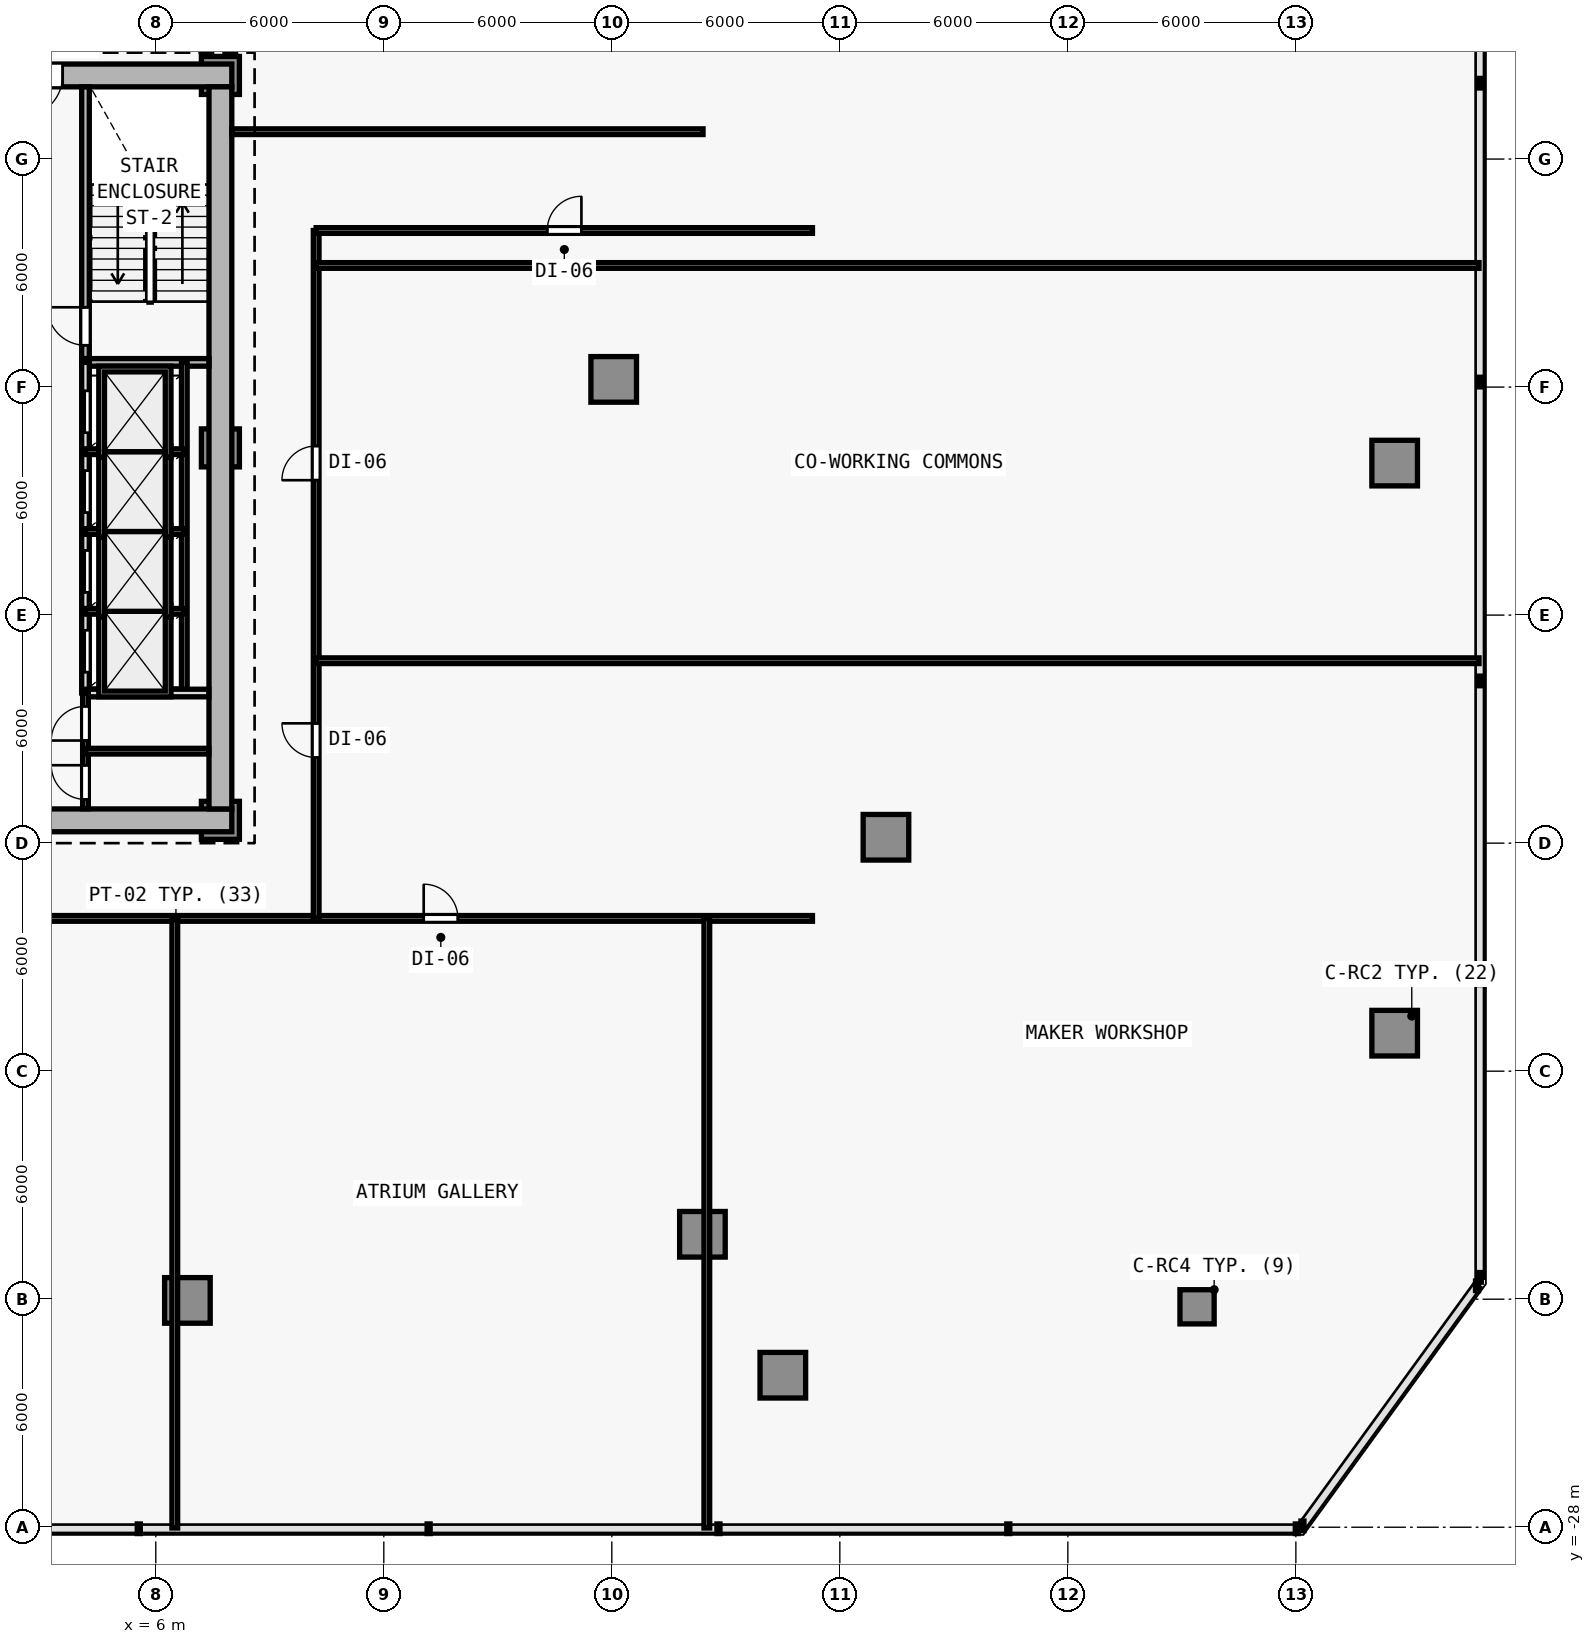
"""IFC4 building model, lengths in metres.
Left out: names, types, materials, properties, quantities, classifications, styles, units other than length and angle.
Written with IfcOpenShell. Run it as: python <this file> out.ifc"""

import sys

from ifc_helpers import new_model, si_unit, direction, frame, frame_2d, origin, origin_2d, place, context, subcontext, project, spatial, rectangle, extrude, element, fill, save


model = new_model("IFC4")
c1 = context("Model", 3, precision=1e-05, world=origin(), true_north=direction((0.0, 1.0)))
c2 = subcontext(c1, "Body", "Model", "MODEL_VIEW")
j1 = project(units=[si_unit("LENGTHUNIT", "METRE"), si_unit("PLANEANGLEUNIT", "RADIAN")], contexts=[c1])
p1 = place(None, origin())
s1 = spatial("IfcSite", under=j1, at=p1, CompositionType="ELEMENT")
p2 = place(p1, origin())
s2 = spatial("IfcBuilding", under=s1, at=p2, CompositionType="ELEMENT")
p3 = place(p2, frame((0.0, 0.0, 13.4)))
s3 = spatial("IfcBuildingStorey", under=s2, at=p3, CompositionType="ELEMENT", Elevation=13.4)
for number, where, z_axis, x_axis in (
    (1, (7.7, -9.4, 0.0), (0.0, 0.0, 1.0), (1.0, 0.0, 0.0)),
    (2, (7.7, 10.2, 0.0), (0.0, 0.0, 1.0), (1.0, 0.0, 0.0)),
    (3, (7.7, 0.4, 0.0), (0.0, 0.0, 1.0), (1.0, 0.0, 0.0)),
):
    element("IfcColumn", number, at=place(p3, frame(where, z_axis=z_axis, x_axis=x_axis)), inside=s3, PredefinedType="COLUMN", context=c2, shape_type="SweptSolid", body=[
        extrude(rectangle(XDim=1.0, YDim=1.0, at=origin_2d()), origin(), (0.0, 0.0, 1.0), 4.2),
    ])
for number, where, z_axis, x_axis in (
    (4, (38.6, -15.0, 0.0), (0.0, 0.0, 1.0), (1.0, 0.0, 0.0)),
    (5, (38.6, 0.0, 0.0), (0.0, 0.0, 1.0), (1.0, 0.0, 0.0)),
    (6, (22.5, -24.0, 0.0), (0.0, 0.0, 1.0), (1.0, 0.0, 0.0)),
    (7, (6.832, -22.032, 0.0), (0.0, 0.0, 1.0), (1.0, 0.0, 0.0)),
    (8, (20.384, -20.292, 0.0), (0.0, 0.0, 1.0), (1.0, 0.0, 0.0)),
    (9, (25.213, -9.845, 0.0), (0.0, 0.0, 1.0), (1.0, 0.0, 0.0)),
    (10, (18.05, 2.202, 0.0), (0.0, 0.0, 1.0), (1.0, 0.0, 0.0)),
):
    element("IfcColumn", number, at=place(p3, frame(where, z_axis=z_axis, x_axis=x_axis)), inside=s3, PredefinedType="COLUMN", context=c2, shape_type="SweptSolid", body=[
        extrude(rectangle(XDim=1.2, YDim=1.2, at=origin_2d()), origin(), (0.0, 0.0, 1.0), 4.2),
    ])
p4 = place(p3, frame((33.4, -22.2, 0.0), z_axis=(0.0, 0.0, 1.0), x_axis=(1.0, 0.0, 0.0)))
e11 = element("IfcColumn", 11, at=p4, inside=s3, PredefinedType="COLUMN", context=c2, shape_type="SweptSolid", body=[
    extrude(rectangle(XDim=0.9, YDim=0.9, at=origin_2d()), origin(), (0.0, 0.0, 1.0), 4.2),
])
p5 = place(p3, frame((-8.0, -9.4, 0.0), z_axis=(0.0, 0.0, 1.0), x_axis=(1.0, 0.0, 0.0)))
e12 = element("IfcWall", 12, at=p5, inside=s3, PredefinedType="SHEAR", context=c2, shape_type="SweptSolid", body=[
    extrude(rectangle(XDim=16.0, YDim=0.6, at=frame_2d((8.0, 0.0))), origin(), (0.0, 0.0, 1.0), 3.92),
])
p6 = place(p5, frame((9.65, 0.0, 0.0)))
e13 = element("IfcOpeningElement", 13, at=p6, cuts=e12, PredefinedType="OPENING", context=c2, shape_type="SweptSolid", body=[
    extrude(rectangle(XDim=1.5, YDim=2.2, at=frame_2d((0.75, 1.1))), frame((0.0, 0.31, 0.0), z_axis=(0.0, -1.0, 0.0), x_axis=(1.0, 0.0, 0.0)), (0.0, 0.0, 1.0), 0.62),
])
p7 = place(p3, frame((8.0, 10.2, 0.0), z_axis=(0.0, 0.0, 1.0), x_axis=(-1.0, 0.0, 0.0)))
e14 = element("IfcWall", 14, at=p7, inside=s3, PredefinedType="SHEAR", context=c2, shape_type="SweptSolid", body=[
    extrude(rectangle(XDim=16.0, YDim=0.6, at=frame_2d((8.0, 0.0))), origin(), (0.0, 0.0, 1.0), 3.92),
])
p8 = place(p7, frame((4.45, 0.0, 0.0)))
e15 = element("IfcOpeningElement", 15, at=p8, cuts=e14, PredefinedType="OPENING", context=c2, shape_type="SweptSolid", body=[
    extrude(rectangle(XDim=1.1, YDim=2.15, at=frame_2d((0.55, 1.075))), frame((0.0, 0.31, 0.0), z_axis=(0.0, -1.0, 0.0), x_axis=(1.0, 0.0, 0.0)), (0.0, 0.0, 1.0), 0.62),
])
p9 = place(p3, frame((7.7, 9.9, 0.0), z_axis=(0.0, 0.0, 1.0), x_axis=(0.0, -1.0, 0.0)))
e16 = element("IfcWall", 16, at=p9, inside=s3, PredefinedType="SHEAR", context=c2, shape_type="SweptSolid", body=[
    extrude(rectangle(XDim=19.0, YDim=0.6, at=frame_2d((9.5, 0.0))), origin(), (0.0, 0.0, 1.0), 3.92),
])
p10 = place(p3, frame((4.15, 2.75, 0.0), z_axis=(0.0, 0.0, 1.0), x_axis=(0.0, 1.0, 0.0)))
e17 = element("IfcWall", 17, at=p10, inside=s3, PredefinedType="SOLIDWALL", context=c2, shape_type="SweptSolid", body=[
    extrude(rectangle(XDim=7.15, YDim=0.2, at=frame_2d((3.575, 0.0))), origin(), (0.0, 0.0, 1.0), 3.92),
])
p11 = place(p10, frame((0.35, 0.0, 0.0)))
e18 = element("IfcOpeningElement", 18, at=p11, cuts=e17, PredefinedType="OPENING", context=c2, shape_type="SweptSolid", body=[
    extrude(rectangle(XDim=1.0, YDim=2.15, at=frame_2d((0.5, 1.075))), frame((0.0, 0.11, 0.0), z_axis=(0.0, -1.0, 0.0), x_axis=(1.0, 0.0, 0.0)), (0.0, 0.0, 1.0), 0.22),
])
p12 = place(p3, frame((4.05, 2.65, 0.0), z_axis=(0.0, 0.0, 1.0), x_axis=(1.0, 0.0, 0.0)))
e19 = element("IfcWall", 19, at=p12, inside=s3, PredefinedType="SOLIDWALL", context=c2, shape_type="SweptSolid", body=[
    extrude(rectangle(XDim=3.35, YDim=0.2, at=frame_2d((1.675, 0.0))), origin(), (0.0, 0.0, 1.0), 3.92),
])
p13 = place(p3, frame((4.15, -6.05, 0.0), z_axis=(0.0, 0.0, 1.0), x_axis=(0.0, 1.0, 0.0)))
e20 = element("IfcWall", 20, at=p13, inside=s3, PredefinedType="SOLIDWALL", context=c2, shape_type="SweptSolid", body=[
    extrude(rectangle(XDim=8.7, YDim=0.2, at=frame_2d((4.35, 0.0))), origin(), (0.0, 0.0, 1.0), 3.92),
])
p14 = place(p13, frame((0.55, 0.0, 0.0)))
e21 = element("IfcOpeningElement", 21, at=p14, cuts=e20, PredefinedType="OPENING", context=c2, shape_type="SweptSolid", body=[
    extrude(rectangle(XDim=1.1, YDim=2.15, at=frame_2d((0.55, 1.075))), frame((0.0, 0.11, 0.0), z_axis=(0.0, -1.0, 0.0), x_axis=(1.0, 0.0, 0.0)), (0.0, 0.0, 1.0), 0.22),
])
p15 = place(p13, frame((2.65, 0.0, 0.0)))
e22 = element("IfcOpeningElement", 22, at=p15, cuts=e20, PredefinedType="OPENING", context=c2, shape_type="SweptSolid", body=[
    extrude(rectangle(XDim=1.1, YDim=2.15, at=frame_2d((0.55, 1.075))), frame((0.0, 0.11, 0.0), z_axis=(0.0, -1.0, 0.0), x_axis=(1.0, 0.0, 0.0)), (0.0, 0.0, 1.0), 0.22),
])
p16 = place(p13, frame((4.75, 0.0, 0.0)))
e23 = element("IfcOpeningElement", 23, at=p16, cuts=e20, PredefinedType="OPENING", context=c2, shape_type="SweptSolid", body=[
    extrude(rectangle(XDim=1.1, YDim=2.15, at=frame_2d((0.55, 1.075))), frame((0.0, 0.11, 0.0), z_axis=(0.0, -1.0, 0.0), x_axis=(1.0, 0.0, 0.0)), (0.0, 0.0, 1.0), 0.22),
])
p17 = place(p13, frame((6.85, 0.0, 0.0)))
e24 = element("IfcOpeningElement", 24, at=p17, cuts=e20, PredefinedType="OPENING", context=c2, shape_type="SweptSolid", body=[
    extrude(rectangle(XDim=1.1, YDim=2.15, at=frame_2d((0.55, 1.075))), frame((0.0, 0.11, 0.0), z_axis=(0.0, -1.0, 0.0), x_axis=(1.0, 0.0, 0.0)), (0.0, 0.0, 1.0), 0.22),
])
p18 = place(p3, frame((6.75, -6.05, 0.0), z_axis=(0.0, 0.0, 1.0), x_axis=(0.0, 1.0, 0.0)))
e25 = element("IfcWall", 25, at=p18, inside=s3, PredefinedType="PARTITIONING", context=c2, shape_type="SweptSolid", body=[
    extrude(rectangle(XDim=8.7, YDim=0.15, at=frame_2d((4.35, 0.0))), origin(), (0.0, 0.0, 1.0), 3.92),
])
for number, where, z_axis, x_axis in (
    (26, (4.15, -3.9, 0.0), (0.0, 0.0, 1.0), (1.0, 0.0, 0.0)),
    (27, (4.15, -1.8, 0.0), (0.0, 0.0, 1.0), (1.0, 0.0, 0.0)),
    (28, (4.15, 0.3, 0.0), (0.0, 0.0, 1.0), (1.0, 0.0, 0.0)),
):
    element("IfcWall", number, at=place(p3, frame(where, z_axis=z_axis, x_axis=x_axis)), inside=s3, PredefinedType="PARTITIONING", context=c2, shape_type="SweptSolid", body=[
        extrude(rectangle(XDim=2.6, YDim=0.15, at=frame_2d((1.3, 0.0))), origin(), (0.0, 0.0, 1.0), 3.92),
    ])
p19 = place(p3, frame((4.15, -6.05, 0.0), z_axis=(0.0, 0.0, 1.0), x_axis=(1.0, 0.0, 0.0)))
e29 = element("IfcWall", 29, at=p19, inside=s3, PredefinedType="SOLIDWALL", context=c2, shape_type="SweptSolid", body=[
    extrude(rectangle(XDim=3.245, YDim=0.2, at=frame_2d((1.623, 0.0))), origin(), (0.0, 0.0, 1.0), 3.92),
])
p20 = place(p3, frame((4.15, -9.095, 0.0), z_axis=(0.0, 0.0, 1.0), x_axis=(0.0, 1.0, 0.0)))
e30 = element("IfcWall", 30, at=p20, inside=s3, PredefinedType="PARTITIONING", context=c2, shape_type="SweptSolid", body=[
    extrude(rectangle(XDim=3.045, YDim=0.15, at=frame_2d((1.522, 0.0))), origin(), (0.0, 0.0, 1.0), 3.92),
])
p21 = place(p20, frame((0.245, 0.0, 0.0)))
e31 = element("IfcOpeningElement", 31, at=p21, cuts=e30, PredefinedType="OPENING", context=c2, shape_type="SweptSolid", body=[
    extrude(rectangle(XDim=0.9, YDim=2.1, at=frame_2d((0.45, 1.05))), frame((0.0, 0.085, 0.0), z_axis=(0.0, -1.0, 0.0), x_axis=(1.0, 0.0, 0.0)), (0.0, 0.0, 1.0), 0.17),
])
p22 = place(p20, frame((1.795, 0.0, 0.0)))
e32 = element("IfcOpeningElement", 32, at=p22, cuts=e30, PredefinedType="OPENING", context=c2, shape_type="SweptSolid", body=[
    extrude(rectangle(XDim=0.9, YDim=2.1, at=frame_2d((0.45, 1.05))), frame((0.0, 0.085, 0.0), z_axis=(0.0, -1.0, 0.0), x_axis=(1.0, 0.0, 0.0)), (0.0, 0.0, 1.0), 0.17),
])
p23 = place(p3, frame((4.15, -7.58, 0.0), z_axis=(0.0, 0.0, 1.0), x_axis=(1.0, 0.0, 0.0)))
e33 = element("IfcWall", 33, at=p23, inside=s3, PredefinedType="PARTITIONING", context=c2, shape_type="SweptSolid", body=[
    extrude(rectangle(XDim=3.245, YDim=0.15, at=frame_2d((1.623, 0.0))), origin(), (0.0, 0.0, 1.0), 3.92),
])
p24 = place(p3, frame((-10.22, -11.98, 0.0), z_axis=(0.0, 0.0, 1.0), x_axis=(1.0, 0.0, 0.0)))
e34 = element("IfcWall", 34, at=p24, inside=s3, PredefinedType="PARTITIONING", context=c2, shape_type="SweptSolid", body=[
    extrude(rectangle(XDim=33.5, YDim=0.15, at=frame_2d((16.75, 0.0))), origin(), (0.0, 0.0, 1.0), 3.195),
])
p25 = place(p24, frame((8.52, 0.0, 0.0)))
e35 = element("IfcOpeningElement", 35, at=p25, cuts=e34, PredefinedType="OPENING", context=c2, shape_type="SweptSolid", body=[
    extrude(rectangle(XDim=0.9, YDim=2.1, at=frame_2d((0.45, 1.05))), frame((0.0, 0.085, 0.0), z_axis=(0.0, -1.0, 0.0), x_axis=(1.0, 0.0, 0.0)), (0.0, 0.0, 1.0), 0.17),
])
p26 = place(p24, frame((23.27, 0.0, 0.0)))
e36 = element("IfcOpeningElement", 36, at=p26, cuts=e34, PredefinedType="OPENING", context=c2, shape_type="SweptSolid", body=[
    extrude(rectangle(XDim=0.9, YDim=2.1, at=frame_2d((0.45, 1.05))), frame((0.0, 0.085, 0.0), z_axis=(0.0, -1.0, 0.0), x_axis=(1.0, 0.0, 0.0)), (0.0, 0.0, 1.0), 0.17),
])
p27 = place(p3, frame((10.22, -11.98, 0.0), z_axis=(0.0, 0.0, 1.0), x_axis=(0.0, 1.0, 0.0)))
e37 = element("IfcWall", 37, at=p27, inside=s3, PredefinedType="PARTITIONING", context=c2, shape_type="SweptSolid", body=[
    extrude(rectangle(XDim=18.1, YDim=0.15, at=frame_2d((9.05, 0.0))), origin(), (0.0, 0.0, 1.0), 3.195),
])
p28 = place(p27, frame((4.232, 0.0, 0.0)))
e38 = element("IfcOpeningElement", 38, at=p28, cuts=e37, PredefinedType="OPENING", context=c2, shape_type="SweptSolid", body=[
    extrude(rectangle(XDim=0.9, YDim=2.1, at=frame_2d((0.45, 1.05))), frame((0.0, 0.085, 0.0), z_axis=(0.0, -1.0, 0.0), x_axis=(1.0, 0.0, 0.0)), (0.0, 0.0, 1.0), 0.17),
])
p29 = place(p27, frame((11.53, 0.0, 0.0)))
e39 = element("IfcOpeningElement", 39, at=p29, cuts=e37, PredefinedType="OPENING", context=c2, shape_type="SweptSolid", body=[
    extrude(rectangle(XDim=0.9, YDim=2.1, at=frame_2d((0.45, 1.05))), frame((0.0, 0.085, 0.0), z_axis=(0.0, -1.0, 0.0), x_axis=(1.0, 0.0, 0.0)), (0.0, 0.0, 1.0), 0.17),
])
p30 = place(p3, frame((10.22, 6.12, 0.0), z_axis=(0.0, 0.0, 1.0), x_axis=(1.0, 0.0, 0.0)))
e40 = element("IfcWall", 40, at=p30, inside=s3, PredefinedType="PARTITIONING", context=c2, shape_type="SweptSolid", body=[
    extrude(rectangle(XDim=13.06, YDim=0.15, at=frame_2d((6.53, 0.0))), origin(), (0.0, 0.0, 1.0), 3.92),
])
p31 = place(p30, frame((6.08, 0.0, 0.0)))
e41 = element("IfcOpeningElement", 41, at=p31, cuts=e40, PredefinedType="OPENING", context=c2, shape_type="SweptSolid", body=[
    extrude(rectangle(XDim=0.9, YDim=2.1, at=frame_2d((0.45, 1.05))), frame((0.0, 0.085, 0.0), z_axis=(0.0, -1.0, 0.0), x_axis=(1.0, 0.0, 0.0)), (0.0, 0.0, 1.0), 0.17),
])
p32 = place(p3, frame((8.0, 8.72, 0.0), z_axis=(0.0, 0.0, 1.0), x_axis=(1.0, 0.0, 0.0)))
e42 = element("IfcWall", 42, at=p32, inside=s3, PredefinedType="PARTITIONING", context=c2, shape_type="SweptSolid", body=[
    extrude(rectangle(XDim=12.4, YDim=0.15, at=frame_2d((6.2, 0.0))), origin(), (0.0, 0.0, 1.0), 3.92),
])
p33 = place(p3, frame((10.22, 5.2, 0.0), z_axis=(0.0, 0.0, 1.0), x_axis=(1.0, 0.0, 0.0)))
e43 = element("IfcWall", 43, at=p33, inside=s3, PredefinedType="PARTITIONING", context=c2, shape_type="SweptSolid", body=[
    extrude(rectangle(XDim=30.6, YDim=0.15, at=frame_2d((15.3, 0.0))), origin(), (0.0, 0.0, 1.0), 3.305),
])
for number, where, z_axis, x_axis in (
    (44, (6.5, -28.02, 0.0), (0.0, 0.0, 1.0), (0.0, 1.0, 0.0)),
    (45, (20.5, -28.02, 0.0), (0.0, 0.0, 1.0), (0.0, 1.0, 0.0)),
):
    element("IfcWall", number, at=place(p3, frame(where, z_axis=z_axis, x_axis=x_axis)), inside=s3, PredefinedType="PARTITIONING", context=c2, shape_type="SweptSolid", body=[
        extrude(rectangle(XDim=16.04, YDim=0.15, at=frame_2d((8.02, 0.0))), origin(), (0.0, 0.0, 1.0), 3.195),
    ])
p34 = place(p3, frame((10.22, -5.2, 0.0), z_axis=(0.0, 0.0, 1.0), x_axis=(1.0, 0.0, 0.0)))
e46 = element("IfcWall", 46, at=p34, inside=s3, PredefinedType="PARTITIONING", context=c2, shape_type="SweptSolid", body=[
    extrude(rectangle(XDim=30.6, YDim=0.15, at=frame_2d((15.3, 0.0))), origin(), (0.0, 0.0, 1.0), 3.305),
])
p35 = place(p8, origin())
e47 = element("IfcDoor", 47, at=p35, inside=s3, OperationType="SINGLE_SWING_RIGHT", PredefinedType="DOOR", context=c2, shape_type="SweptSolid", body=[
    extrude(rectangle(XDim=1.1, YDim=2.15, at=frame_2d((0.55, 1.075))), frame((0.0, 0.025, 0.0), z_axis=(0.0, -1.0, 0.0), x_axis=(1.0, 0.0, 0.0)), (0.0, 0.0, 1.0), 0.05),
])
fill(e15, e47)
p36 = place(p11, origin())
e48 = element("IfcDoor", 48, at=p36, inside=s3, OperationType="SINGLE_SWING_RIGHT", PredefinedType="DOOR", context=c2, shape_type="SweptSolid", body=[
    extrude(rectangle(XDim=1.0, YDim=2.15, at=frame_2d((0.5, 1.075))), frame((0.0, 0.025, 0.0), z_axis=(0.0, -1.0, 0.0), x_axis=(1.0, 0.0, 0.0)), (0.0, 0.0, 1.0), 0.05),
])
fill(e18, e48)
p37 = place(p14, origin())
e49 = element("IfcDoor", 49, at=p37, inside=s3, OperationType="DOUBLE_DOOR_SLIDING", PredefinedType="DOOR", context=c2, shape_type="SweptSolid", body=[
    extrude(rectangle(XDim=1.1, YDim=2.15, at=frame_2d((0.55, 1.075))), frame((0.0, 0.025, 0.0), z_axis=(0.0, -1.0, 0.0), x_axis=(1.0, 0.0, 0.0)), (0.0, 0.0, 1.0), 0.05),
])
fill(e21, e49)
p38 = place(p15, origin())
e50 = element("IfcDoor", 50, at=p38, inside=s3, OperationType="DOUBLE_DOOR_SLIDING", PredefinedType="DOOR", context=c2, shape_type="SweptSolid", body=[
    extrude(rectangle(XDim=1.1, YDim=2.15, at=frame_2d((0.55, 1.075))), frame((0.0, 0.025, 0.0), z_axis=(0.0, -1.0, 0.0), x_axis=(1.0, 0.0, 0.0)), (0.0, 0.0, 1.0), 0.05),
])
fill(e22, e50)
p39 = place(p16, origin())
e51 = element("IfcDoor", 51, at=p39, inside=s3, OperationType="DOUBLE_DOOR_SLIDING", PredefinedType="DOOR", context=c2, shape_type="SweptSolid", body=[
    extrude(rectangle(XDim=1.1, YDim=2.15, at=frame_2d((0.55, 1.075))), frame((0.0, 0.025, 0.0), z_axis=(0.0, -1.0, 0.0), x_axis=(1.0, 0.0, 0.0)), (0.0, 0.0, 1.0), 0.05),
])
fill(e23, e51)
p40 = place(p17, origin())
e52 = element("IfcDoor", 52, at=p40, inside=s3, OperationType="DOUBLE_DOOR_SLIDING", PredefinedType="DOOR", context=c2, shape_type="SweptSolid", body=[
    extrude(rectangle(XDim=1.1, YDim=2.15, at=frame_2d((0.55, 1.075))), frame((0.0, 0.025, 0.0), z_axis=(0.0, -1.0, 0.0), x_axis=(1.0, 0.0, 0.0)), (0.0, 0.0, 1.0), 0.05),
])
fill(e24, e52)
p41 = place(p21, origin())
e53 = element("IfcDoor", 53, at=p41, inside=s3, OperationType="SINGLE_SWING_RIGHT", PredefinedType="DOOR", context=c2, shape_type="SweptSolid", body=[
    extrude(rectangle(XDim=0.9, YDim=2.1, at=frame_2d((0.45, 1.05))), frame((0.0, 0.025, 0.0), z_axis=(0.0, -1.0, 0.0), x_axis=(1.0, 0.0, 0.0)), (0.0, 0.0, 1.0), 0.05),
])
fill(e31, e53)
p42 = place(p22, origin())
e54 = element("IfcDoor", 54, at=p42, inside=s3, OperationType="SINGLE_SWING_LEFT", PredefinedType="DOOR", context=c2, shape_type="SweptSolid", body=[
    extrude(rectangle(XDim=0.9, YDim=2.1, at=frame_2d((0.45, 1.05))), frame((0.0, 0.025, 0.0), z_axis=(0.0, -1.0, 0.0), x_axis=(1.0, 0.0, 0.0)), (0.0, 0.0, 1.0), 0.05),
])
fill(e32, e54)
p43 = place(p26, origin())
e55 = element("IfcDoor", 55, at=p43, inside=s3, OperationType="SINGLE_SWING_LEFT", PredefinedType="DOOR", context=c2, shape_type="SweptSolid", body=[
    extrude(rectangle(XDim=0.9, YDim=2.1, at=frame_2d((0.45, 1.05))), frame((0.0, 0.025, 0.0), z_axis=(0.0, -1.0, 0.0), x_axis=(1.0, 0.0, 0.0)), (0.0, 0.0, 1.0), 0.05),
])
fill(e36, e55)
p44 = place(p28, origin())
e56 = element("IfcDoor", 56, at=p44, inside=s3, OperationType="SINGLE_SWING_RIGHT", PredefinedType="DOOR", context=c2, shape_type="SweptSolid", body=[
    extrude(rectangle(XDim=0.9, YDim=2.1, at=frame_2d((0.45, 1.05))), frame((0.0, 0.025, 0.0), z_axis=(0.0, -1.0, 0.0), x_axis=(1.0, 0.0, 0.0)), (0.0, 0.0, 1.0), 0.05),
])
fill(e38, e56)
p45 = place(p29, origin())
e57 = element("IfcDoor", 57, at=p45, inside=s3, OperationType="SINGLE_SWING_LEFT", PredefinedType="DOOR", context=c2, shape_type="SweptSolid", body=[
    extrude(rectangle(XDim=0.9, YDim=2.1, at=frame_2d((0.45, 1.05))), frame((0.0, 0.025, 0.0), z_axis=(0.0, -1.0, 0.0), x_axis=(1.0, 0.0, 0.0)), (0.0, 0.0, 1.0), 0.05),
])
fill(e39, e57)
p46 = place(p31, origin())
e58 = element("IfcDoor", 58, at=p46, inside=s3, OperationType="SINGLE_SWING_RIGHT", PredefinedType="DOOR", context=c2, shape_type="SweptSolid", body=[
    extrude(rectangle(XDim=0.9, YDim=2.1, at=frame_2d((0.45, 1.05))), frame((0.0, 0.025, 0.0), z_axis=(0.0, -1.0, 0.0), x_axis=(1.0, 0.0, 0.0)), (0.0, 0.0, 1.0), 0.05),
])
fill(e41, e58)
save(model, sys.argv[1])
